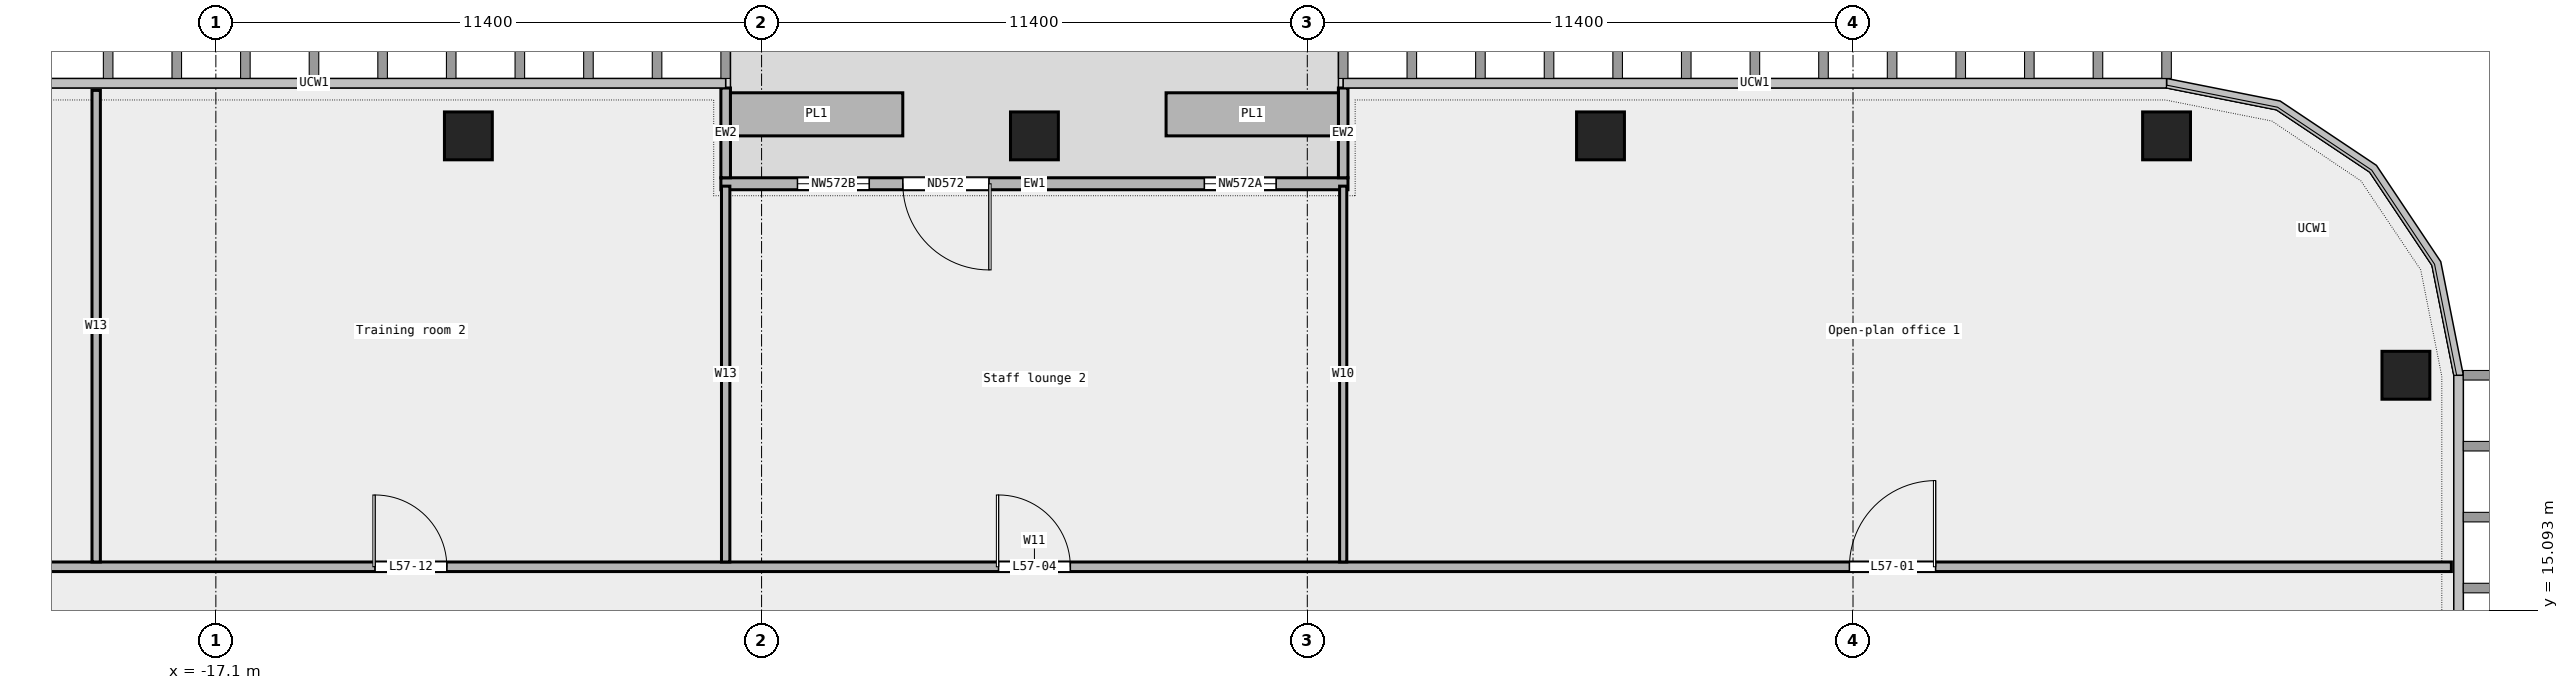
"""IFC4 building model, lengths in metres.
Left out: names, types, materials, properties, quantities, classifications, styles, units other than length and angle.
Written with IfcOpenShell. Run it as: python <this file> out.ifc"""

import sys

from ifc_helpers import new_model, si_unit, direction, frame, frame_2d, origin, origin_2d, place, context, subcontext, project, spatial, rectangle, extrude, element, fill, save


model = new_model("IFC4")
c1 = context("Model", 3, precision=1e-05, world=origin(), true_north=direction((0.0, 1.0)))
c2 = subcontext(c1, "Body", "Model", "MODEL_VIEW")
j1 = project(units=[si_unit("LENGTHUNIT", "METRE"), si_unit("PLANEANGLEUNIT", "RADIAN")], contexts=[c1])
p1 = place(None, origin())
s1 = spatial("IfcSite", under=j1, at=p1, CompositionType="ELEMENT")
p2 = place(p1, origin())
s2 = spatial("IfcBuilding", under=s1, at=p2, CompositionType="ELEMENT")
p3 = place(p2, frame((0.0, 0.0, 267.4)))
s3 = spatial("IfcBuildingStorey", under=s2, at=p3, CompositionType="ELEMENT", Elevation=267.4)
for number, where, z_axis, x_axis in (
    (1, (28.65, 20.0, 0.0), (0.0, 0.0, 1.0), (1.0, 0.0, 0.0)),
    (2, (23.65, 25.0, 0.0), (0.0, 0.0, 1.0), (1.0, 0.0, 0.0)),
    (3, (11.825, 25.0, 0.0), (0.0, 0.0, 1.0), (1.0, 0.0, 0.0)),
    (4, (0.0, 25.0, 0.0), (0.0, 0.0, 1.0), (1.0, 0.0, 0.0)),
    (5, (-11.825, 25.0, 0.0), (0.0, 0.0, 1.0), (1.0, 0.0, 0.0)),
):
    element("IfcColumn", number, at=place(p3, frame(where, z_axis=z_axis, x_axis=x_axis)), inside=s3, PredefinedType="COLUMN", context=c2, shape_type="SweptSolid", body=[
        extrude(rectangle(XDim=1.0, YDim=1.0, at=origin_2d()), origin(), (0.0, 0.0, 1.0), 3.6),
    ])
p4 = place(p3, frame((6.55, 24.0, 0.0), z_axis=(0.0, 0.0, 1.0), x_axis=(-1.0, 0.0, 0.0)))
e6 = element("IfcWall", 6, at=p4, inside=s3, PredefinedType="STANDARD", context=c2, shape_type="SweptSolid", body=[
    extrude(rectangle(XDim=13.1, YDim=0.25, at=frame_2d((6.55, 0.0))), origin(), (0.0, 0.0, 1.0), 3.6),
])
p5 = place(p4, frame((1.5, 0.0, 0.45)))
e7 = element("IfcOpeningElement", 7, at=p5, cuts=e6, PredefinedType="OPENING", context=c2, shape_type="SweptSolid", body=[
    extrude(rectangle(XDim=1.5, YDim=2.4, at=frame_2d((0.75, 1.2))), frame((0.0, 0.137, 0.0), z_axis=(0.0, -1.0, 0.0), x_axis=(1.0, 0.0, 0.0)), (0.0, 0.0, 1.0), 0.274),
])
p6 = place(p4, frame((7.5, 0.0, 0.0)))
e8 = element("IfcOpeningElement", 8, at=p6, cuts=e6, PredefinedType="OPENING", context=c2, shape_type="SweptSolid", body=[
    extrude(rectangle(XDim=1.8, YDim=2.4, at=frame_2d((0.9, 1.2))), frame((0.0, 0.137, 0.0), z_axis=(0.0, -1.0, 0.0), x_axis=(1.0, 0.0, 0.0)), (0.0, 0.0, 1.0), 0.274),
])
p7 = place(p4, frame((10.0, 0.0, 0.45)))
e9 = element("IfcOpeningElement", 9, at=p7, cuts=e6, PredefinedType="OPENING", context=c2, shape_type="SweptSolid", body=[
    extrude(rectangle(XDim=1.5, YDim=2.4, at=frame_2d((0.75, 1.2))), frame((0.0, 0.137, 0.0), z_axis=(0.0, -1.0, 0.0), x_axis=(1.0, 0.0, 0.0)), (0.0, 0.0, 1.0), 0.274),
])
for number, where, z_axis, x_axis in (
    (10, (6.45, 26.0, 0.0), (0.0, 0.0, 1.0), (0.0, -1.0, 0.0)),
    (11, (-6.45, 26.0, 0.0), (0.0, 0.0, 1.0), (0.0, -1.0, 0.0)),
):
    element("IfcWall", number, at=place(p3, frame(where, z_axis=z_axis, x_axis=x_axis)), inside=s3, PredefinedType="STANDARD", context=c2, shape_type="SweptSolid", body=[
        extrude(rectangle(XDim=1.875, YDim=0.2, at=frame_2d((0.938, 0.0))), origin(), (0.0, 0.0, 1.0), 3.6),
    ])
for number, where, z_axis, x_axis in (
    (12, (6.35, 25.45, 0.0), (0.0, 0.0, 1.0), (-1.0, 0.0, 0.0)),
    (13, (-2.75, 25.45, 0.0), (0.0, 0.0, 1.0), (-1.0, 0.0, 0.0)),
):
    element("IfcWall", number, at=place(p3, frame(where, z_axis=z_axis, x_axis=x_axis)), inside=s3, PredefinedType="STANDARD", context=c2, shape_type="SweptSolid", body=[
        extrude(rectangle(XDim=3.6, YDim=0.9, at=frame_2d((1.8, 0.0))), origin(), (0.0, 0.0, 1.0), 0.7),
    ])
p8 = place(p3, frame((-29.6, 16.0, 0.0), z_axis=(0.0, 0.0, 1.0), x_axis=(1.0, 0.0, 0.0)))
e14 = element("IfcWall", 14, at=p8, inside=s3, PredefinedType="PARTITIONING", context=c2, shape_type="SweptSolid", body=[
    extrude(rectangle(XDim=59.2, YDim=0.2, at=frame_2d((29.6, 0.0))), origin(), (0.0, 0.0, 1.0), 3.6),
])
p9 = place(p8, frame((46.625, 0.0, 0.0)))
e15 = element("IfcOpeningElement", 15, at=p9, cuts=e14, PredefinedType="OPENING", context=c2, shape_type="SweptSolid", body=[
    extrude(rectangle(XDim=1.8, YDim=2.1, at=frame_2d((0.9, 1.05))), frame((0.0, 0.112, 0.0), z_axis=(0.0, -1.0, 0.0), x_axis=(1.0, 0.0, 0.0)), (0.0, 0.0, 1.0), 0.224),
])
p10 = place(p8, frame((28.85, 0.0, 0.0)))
e16 = element("IfcOpeningElement", 16, at=p10, cuts=e14, PredefinedType="OPENING", context=c2, shape_type="SweptSolid", body=[
    extrude(rectangle(XDim=1.5, YDim=2.1, at=frame_2d((0.75, 1.05))), frame((0.0, 0.112, 0.0), z_axis=(0.0, -1.0, 0.0), x_axis=(1.0, 0.0, 0.0)), (0.0, 0.0, 1.0), 0.224),
])
p11 = place(p8, frame((4.5, 0.0, 0.0)))
e17 = element("IfcOpeningElement", 17, at=p11, cuts=e14, PredefinedType="OPENING", context=c2, shape_type="SweptSolid", body=[
    extrude(rectangle(XDim=1.2, YDim=2.1, at=frame_2d((0.6, 1.05))), frame((0.0, 0.112, 0.0), z_axis=(0.0, -1.0, 0.0), x_axis=(1.0, 0.0, 0.0)), (0.0, 0.0, 1.0), 0.224),
])
p12 = place(p8, frame((15.825, 0.0, 0.0)))
e18 = element("IfcOpeningElement", 18, at=p12, cuts=e14, PredefinedType="OPENING", context=c2, shape_type="SweptSolid", body=[
    extrude(rectangle(XDim=1.5, YDim=2.1, at=frame_2d((0.75, 1.05))), frame((0.0, 0.112, 0.0), z_axis=(0.0, -1.0, 0.0), x_axis=(1.0, 0.0, 0.0)), (0.0, 0.0, 1.0), 0.224),
])
p13 = place(p3, frame((-19.6, 16.1, 0.0), z_axis=(0.0, 0.0, 1.0), x_axis=(0.0, 1.0, 0.0)))
e19 = element("IfcWall", 19, at=p13, inside=s3, PredefinedType="PARTITIONING", context=c2, shape_type="SweptSolid", body=[
    extrude(rectangle(XDim=9.85, YDim=0.175, at=frame_2d((4.925, 0.0))), origin(), (0.0, 0.0, 1.0), 3.6),
])
p14 = place(p3, frame((-6.45, 16.1, 0.0), z_axis=(0.0, 0.0, 1.0), x_axis=(0.0, 1.0, 0.0)))
e20 = element("IfcWall", 20, at=p14, inside=s3, PredefinedType="PARTITIONING", context=c2, shape_type="SweptSolid", body=[
    extrude(rectangle(XDim=7.85, YDim=0.175, at=frame_2d((3.925, 0.0))), origin(), (0.0, 0.0, 1.0), 3.6),
])
p15 = place(p3, frame((6.45, 16.1, 0.0), z_axis=(0.0, 0.0, 1.0), x_axis=(0.0, 1.0, 0.0)))
e21 = element("IfcWall", 21, at=p15, inside=s3, PredefinedType="PARTITIONING", context=c2, shape_type="SweptSolid", body=[
    extrude(rectangle(XDim=7.85, YDim=0.15, at=frame_2d((3.925, 0.0))), origin(), (0.0, 0.0, 1.0), 3.6),
])
p16 = place(p5, origin())
e22 = element("IfcWindow", 22, at=p16, inside=s3, PartitioningType="SINGLE_PANEL", PredefinedType="WINDOW", context=c2, shape_type="SweptSolid", body=[
    extrude(rectangle(XDim=1.5, YDim=2.4, at=frame_2d((0.75, 1.2))), frame((0.0, 0.03, 0.0), z_axis=(0.0, -1.0, 0.0), x_axis=(1.0, 0.0, 0.0)), (0.0, 0.0, 1.0), 0.06),
])
fill(e7, e22)
p17 = place(p6, origin())
e23 = element("IfcDoor", 23, at=p17, inside=s3, OperationType="DOUBLE_DOOR_SINGLE_SWING", PredefinedType="DOOR", context=c2, shape_type="SweptSolid", body=[
    extrude(rectangle(XDim=1.8, YDim=2.4, at=frame_2d((0.9, 1.2))), frame((0.0, 0.025, 0.0), z_axis=(0.0, -1.0, 0.0), x_axis=(1.0, 0.0, 0.0)), (0.0, 0.0, 1.0), 0.05),
])
fill(e8, e23)
p18 = place(p7, origin())
e24 = element("IfcWindow", 24, at=p18, inside=s3, PartitioningType="SINGLE_PANEL", PredefinedType="WINDOW", context=c2, shape_type="SweptSolid", body=[
    extrude(rectangle(XDim=1.5, YDim=2.4, at=frame_2d((0.75, 1.2))), frame((0.0, 0.03, 0.0), z_axis=(0.0, -1.0, 0.0), x_axis=(1.0, 0.0, 0.0)), (0.0, 0.0, 1.0), 0.06),
])
fill(e9, e24)
p19 = place(p9, origin())
e25 = element("IfcDoor", 25, at=p19, inside=s3, OperationType="DOUBLE_DOOR_SINGLE_SWING", PredefinedType="DOOR", context=c2, shape_type="SweptSolid", body=[
    extrude(rectangle(XDim=1.8, YDim=2.1, at=frame_2d((0.9, 1.05))), frame((0.0, 0.025, 0.0), z_axis=(0.0, -1.0, 0.0), x_axis=(1.0, 0.0, 0.0)), (0.0, 0.0, 1.0), 0.05),
])
fill(e15, e25)
p20 = place(p10, origin())
e26 = element("IfcDoor", 26, at=p20, inside=s3, OperationType="DOUBLE_DOOR_SINGLE_SWING", PredefinedType="DOOR", context=c2, shape_type="SweptSolid", body=[
    extrude(rectangle(XDim=1.5, YDim=2.1, at=frame_2d((0.75, 1.05))), frame((0.0, 0.025, 0.0), z_axis=(0.0, -1.0, 0.0), x_axis=(1.0, 0.0, 0.0)), (0.0, 0.0, 1.0), 0.05),
])
fill(e16, e26)
p21 = place(p12, origin())
e27 = element("IfcDoor", 27, at=p21, inside=s3, OperationType="DOUBLE_DOOR_SINGLE_SWING", PredefinedType="DOOR", context=c2, shape_type="SweptSolid", body=[
    extrude(rectangle(XDim=1.5, YDim=2.1, at=frame_2d((0.75, 1.05))), frame((0.0, 0.025, 0.0), z_axis=(0.0, -1.0, 0.0), x_axis=(1.0, 0.0, 0.0)), (0.0, 0.0, 1.0), 0.05),
])
fill(e18, e27)
save(model, sys.argv[1])
